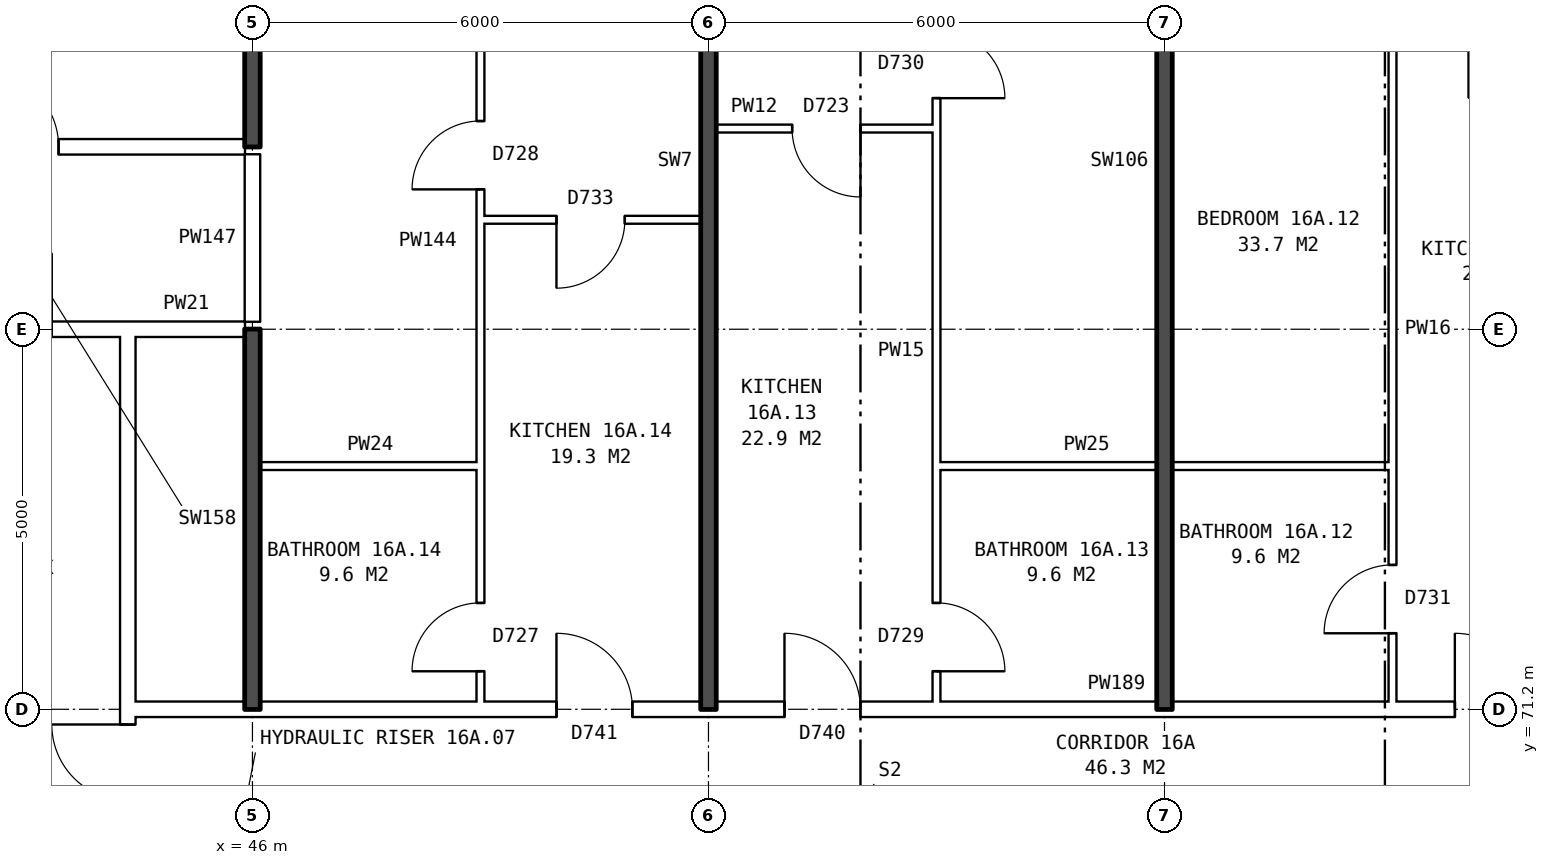
"""IFC4 building model, lengths in metres.
Left out: names, types, materials, properties, quantities, classifications, styles, units other than length and angle.
Written with IfcOpenShell. Run it as: python <this file> out.ifc"""

import sys

from ifc_helpers import new_model, si_unit, direction, frame, frame_2d, origin, place, context, subcontext, project, spatial, rectangle, extrude, element, fill, save


model = new_model("IFC4")
c1 = context("Model", 3, precision=1e-05, world=origin(), true_north=direction((0.0, 1.0)))
c2 = subcontext(c1, "Body", "Model", "MODEL_VIEW")
j1 = project(units=[si_unit("LENGTHUNIT", "METRE"), si_unit("PLANEANGLEUNIT", "RADIAN")], contexts=[c1])
p1 = place(None, origin())
s1 = spatial("IfcSite", under=j1, at=p1, CompositionType="ELEMENT")
p2 = place(p1, origin())
s2 = spatial("IfcBuilding", under=s1, at=p2, CompositionType="ELEMENT")
p3 = place(p2, frame((0.0, 0.0, 59.8)))
s3 = spatial("IfcBuildingStorey", under=s2, at=p3, CompositionType="ELEMENT", Elevation=59.8)
p4 = place(p3, frame((44.36, 63.9, 0.0), z_axis=(0.0, 0.0, 1.0), x_axis=(0.0, 1.0, 0.0)))
e1 = element("IfcWall", 1, at=p4, inside=s3, PredefinedType="PARTITIONING", context=c2, shape_type="SweptSolid", body=[
    extrude(rectangle(XDim=12.2, YDim=0.2, at=frame_2d((6.1, 0.0))), origin(), (0.0, 0.0, 1.0), 2.85),
])
p5 = place(p4, frame((5.1, 0.0, 0.0)))
e2 = element("IfcOpeningElement", 2, at=p5, cuts=e1, PredefinedType="OPENING", context=c2, shape_type="SweptSolid", body=[
    extrude(rectangle(XDim=2.0, YDim=2.1, at=frame_2d((1.0, 1.05))), frame((0.0, 0.11, 0.0), z_axis=(0.0, -1.0, 0.0), x_axis=(1.0, 0.0, 0.0)), (0.0, 0.0, 1.0), 0.22),
])
p6 = place(p3, frame((44.36, 71.2, 0.0), z_axis=(0.0, 0.0, 1.0), x_axis=(1.0, 0.0, 0.0)))
e3 = element("IfcWall", 3, at=p6, inside=s3, PredefinedType="PARTITIONING", context=c2, shape_type="SweptSolid", body=[
    extrude(rectangle(XDim=19.28, YDim=0.2, at=frame_2d((9.64, 0.0))), origin(), (0.0, 0.0, 1.0), 2.85),
])
p7 = place(p6, frame((17.46, 0.0, 0.0)))
e4 = element("IfcOpeningElement", 4, at=p7, cuts=e3, PredefinedType="OPENING", context=c2, shape_type="SweptSolid", body=[
    extrude(rectangle(XDim=1.0, YDim=2.1, at=frame_2d((0.5, 1.05))), frame((0.0, 0.11, 0.0), z_axis=(0.0, -1.0, 0.0), x_axis=(1.0, 0.0, 0.0)), (0.0, 0.0, 1.0), 0.22),
])
p8 = place(p6, frame((8.64, 0.0, 0.0)))
e5 = element("IfcOpeningElement", 5, at=p8, cuts=e3, PredefinedType="OPENING", context=c2, shape_type="SweptSolid", body=[
    extrude(rectangle(XDim=1.0, YDim=2.1, at=frame_2d((0.5, 1.05))), frame((0.0, 0.11, 0.0), z_axis=(0.0, -1.0, 0.0), x_axis=(1.0, 0.0, 0.0)), (0.0, 0.0, 1.0), 0.22),
])
p9 = place(p6, frame((5.64, 0.0, 0.0)))
e6 = element("IfcOpeningElement", 6, at=p9, cuts=e3, PredefinedType="OPENING", context=c2, shape_type="SweptSolid", body=[
    extrude(rectangle(XDim=1.0, YDim=2.1, at=frame_2d((0.5, 1.05))), frame((0.0, 0.11, 0.0), z_axis=(0.0, -1.0, 0.0), x_axis=(1.0, 0.0, 0.0)), (0.0, 0.0, 1.0), 0.22),
])
p10 = place(p3, frame((46.1, 74.4, 0.0), z_axis=(0.0, 0.0, 1.0), x_axis=(1.0, 0.0, 0.0)))
e7 = element("IfcWall", 7, at=p10, inside=s3, PredefinedType="PARTITIONING", context=c2, shape_type="SweptSolid", body=[
    extrude(rectangle(XDim=2.9, YDim=0.1, at=frame_2d((1.45, 0.0))), origin(), (0.0, 0.0, 1.0), 2.85),
])
p11 = place(p3, frame((55.0, 74.4, 0.0), z_axis=(0.0, 0.0, 1.0), x_axis=(1.0, 0.0, 0.0)))
e8 = element("IfcWall", 8, at=p11, inside=s3, PredefinedType="PARTITIONING", context=c2, shape_type="SweptSolid", body=[
    extrude(rectangle(XDim=6.0, YDim=0.1, at=frame_2d((3.0, 0.0))), origin(), (0.0, 0.0, 1.0), 2.85),
])
p12 = place(p3, frame((41.36, 76.2, 0.0), z_axis=(0.0, 0.0, 1.0), x_axis=(1.0, 0.0, 0.0)))
e9 = element("IfcWall", 9, at=p12, inside=s3, PredefinedType="PARTITIONING", context=c2, shape_type="SweptSolid", body=[
    extrude(rectangle(XDim=3.0, YDim=0.2, at=frame_2d((1.5, 0.0))), origin(), (0.0, 0.0, 1.0), 2.85),
])
p13 = place(p12, frame((1.0, 0.0, 0.0)))
e10 = element("IfcOpeningElement", 10, at=p13, cuts=e9, PredefinedType="OPENING", context=c2, shape_type="SweptSolid", body=[
    extrude(rectangle(XDim=1.0, YDim=2.1, at=frame_2d((0.5, 1.05))), frame((0.0, 0.11, 0.0), z_axis=(0.0, -1.0, 0.0), x_axis=(1.0, 0.0, 0.0)), (0.0, 0.0, 1.0), 0.22),
])
p14 = place(p3, frame((44.36, 76.2, 0.0), z_axis=(0.0, 0.0, 1.0), x_axis=(1.0, 0.0, 0.0)))
e11 = element("IfcWall", 11, at=p14, inside=s3, PredefinedType="PARTITIONING", context=c2, shape_type="SweptSolid", body=[
    extrude(rectangle(XDim=1.54, YDim=0.2, at=frame_2d((0.77, 0.0))), origin(), (0.0, 0.0, 1.0), 2.85),
])
p15 = place(p3, frame((49.0, 77.64, 0.0), z_axis=(0.0, 0.0, 1.0), x_axis=(1.0, 0.0, 0.0)))
e12 = element("IfcWall", 12, at=p15, inside=s3, PredefinedType="PARTITIONING", context=c2, shape_type="SweptSolid", body=[
    extrude(rectangle(XDim=2.9, YDim=0.1, at=frame_2d((1.45, 0.0))), origin(), (0.0, 0.0, 1.0), 2.85),
])
p16 = place(p15, frame((1.0, 0.0, 0.0)))
e13 = element("IfcOpeningElement", 13, at=p16, cuts=e12, PredefinedType="OPENING", context=c2, shape_type="SweptSolid", body=[
    extrude(rectangle(XDim=0.9, YDim=2.1, at=frame_2d((0.45, 1.05))), frame((0.0, 0.06, 0.0), z_axis=(0.0, -1.0, 0.0), x_axis=(1.0, 0.0, 0.0)), (0.0, 0.0, 1.0), 0.12),
])
p17 = place(p3, frame((21.86, 78.6, 0.0), z_axis=(0.0, 0.0, 1.0), x_axis=(1.0, 0.0, 0.0)))
e14 = element("IfcWall", 14, at=p17, inside=s3, PredefinedType="PARTITIONING", context=c2, shape_type="SweptSolid", body=[
    extrude(rectangle(XDim=24.04, YDim=0.2, at=frame_2d((12.02, 0.0))), origin(), (0.0, 0.0, 1.0), 2.85),
])
p18 = place(p17, frame((20.59, 0.0, 0.0)))
e15 = element("IfcOpeningElement", 15, at=p18, cuts=e14, PredefinedType="OPENING", context=c2, shape_type="SweptSolid", body=[
    extrude(rectangle(XDim=1.0, YDim=2.1, at=frame_2d((0.5, 1.05))), frame((0.0, 0.11, 0.0), z_axis=(0.0, -1.0, 0.0), x_axis=(1.0, 0.0, 0.0)), (0.0, 0.0, 1.0), 0.22),
])
p19 = place(p17, frame((8.64, 0.0, 0.0)))
e16 = element("IfcOpeningElement", 16, at=p19, cuts=e14, PredefinedType="OPENING", context=c2, shape_type="SweptSolid", body=[
    extrude(rectangle(XDim=1.0, YDim=2.1, at=frame_2d((0.5, 1.05))), frame((0.0, 0.11, 0.0), z_axis=(0.0, -1.0, 0.0), x_axis=(1.0, 0.0, 0.0)), (0.0, 0.0, 1.0), 0.22),
])
p20 = place(p17, frame((3.64, 0.0, 0.0)))
e17 = element("IfcOpeningElement", 17, at=p20, cuts=e14, PredefinedType="OPENING", context=c2, shape_type="SweptSolid", body=[
    extrude(rectangle(XDim=1.0, YDim=2.1, at=frame_2d((0.5, 1.05))), frame((0.0, 0.11, 0.0), z_axis=(0.0, -1.0, 0.0), x_axis=(1.0, 0.0, 0.0)), (0.0, 0.0, 1.0), 0.22),
])
p21 = place(p3, frame((52.1, 78.84, 0.0), z_axis=(0.0, 0.0, 1.0), x_axis=(1.0, 0.0, 0.0)))
e18 = element("IfcWall", 18, at=p21, inside=s3, PredefinedType="PARTITIONING", context=c2, shape_type="SweptSolid", body=[
    extrude(rectangle(XDim=2.9, YDim=0.1, at=frame_2d((1.45, 0.0))), origin(), (0.0, 0.0, 1.0), 2.85),
])
p22 = place(p21, frame((1.0, 0.0, 0.0)))
e19 = element("IfcOpeningElement", 19, at=p22, cuts=e18, PredefinedType="OPENING", context=c2, shape_type="SweptSolid", body=[
    extrude(rectangle(XDim=0.9, YDim=2.1, at=frame_2d((0.45, 1.05))), frame((0.0, 0.06, 0.0), z_axis=(0.0, -1.0, 0.0), x_axis=(1.0, 0.0, 0.0)), (0.0, 0.0, 1.0), 0.12),
])
p23 = place(p3, frame((46.0, 71.2, 0.0), z_axis=(0.0, 0.0, 1.0), x_axis=(0.0, 1.0, 0.0)))
e20 = element("IfcWall", 20, at=p23, inside=s3, PredefinedType="SOLIDWALL", context=c2, shape_type="SweptSolid", body=[
    extrude(rectangle(XDim=5.0, YDim=0.2, at=frame_2d((2.5, 0.0))), origin(), (0.0, 0.0, 1.0), 2.85),
])
p24 = place(p3, frame((46.0, 76.3, 0.0), z_axis=(0.0, 0.0, 1.0), x_axis=(0.0, 1.0, 0.0)))
e21 = element("IfcWall", 21, at=p24, inside=s3, PredefinedType="PARTITIONING", context=c2, shape_type="SweptSolid", body=[
    extrude(rectangle(XDim=2.2, YDim=0.2, at=frame_2d((1.1, 0.0))), origin(), (0.0, 0.0, 1.0), 2.85),
])
p25 = place(p3, frame((46.0, 78.6, 0.0), z_axis=(0.0, 0.0, 1.0), x_axis=(0.0, 1.0, 0.0)))
e22 = element("IfcWall", 22, at=p25, inside=s3, PredefinedType="SOLIDWALL", context=c2, shape_type="SweptSolid", body=[
    extrude(rectangle(XDim=7.04, YDim=0.2, at=frame_2d((3.52, 0.0))), origin(), (0.0, 0.0, 1.0), 2.85),
])
p26 = place(p3, frame((49.0, 71.3, 0.0), z_axis=(0.0, 0.0, 1.0), x_axis=(0.0, 1.0, 0.0)))
e23 = element("IfcWall", 23, at=p26, inside=s3, PredefinedType="PARTITIONING", context=c2, shape_type="SweptSolid", body=[
    extrude(rectangle(XDim=14.34, YDim=0.1, at=frame_2d((7.17, 0.0))), origin(), (0.0, 0.0, 1.0), 2.85),
])
p27 = place(p26, frame((6.74, 0.0, 0.0)))
e24 = element("IfcOpeningElement", 24, at=p27, cuts=e23, PredefinedType="OPENING", context=c2, shape_type="SweptSolid", body=[
    extrude(rectangle(XDim=0.9, YDim=2.1, at=frame_2d((0.45, 1.05))), frame((0.0, 0.06, 0.0), z_axis=(0.0, -1.0, 0.0), x_axis=(1.0, 0.0, 0.0)), (0.0, 0.0, 1.0), 0.12),
])
p28 = place(p26, frame((0.4, 0.0, 0.0)))
e25 = element("IfcOpeningElement", 25, at=p28, cuts=e23, PredefinedType="OPENING", context=c2, shape_type="SweptSolid", body=[
    extrude(rectangle(XDim=0.9, YDim=2.1, at=frame_2d((0.45, 1.05))), frame((0.0, 0.06, 0.0), z_axis=(0.0, -1.0, 0.0), x_axis=(1.0, 0.0, 0.0)), (0.0, 0.0, 1.0), 0.12),
])
p29 = place(p3, frame((52.0, 71.2, 0.0), z_axis=(0.0, 0.0, 1.0), x_axis=(0.0, 1.0, 0.0)))
e26 = element("IfcWall", 26, at=p29, inside=s3, PredefinedType="SOLIDWALL", context=c2, shape_type="SweptSolid", body=[
    extrude(rectangle(XDim=14.44, YDim=0.2, at=frame_2d((7.22, 0.0))), origin(), (0.0, 0.0, 1.0), 2.85),
])
p30 = place(p3, frame((55.0, 71.3, 0.0), z_axis=(0.0, 0.0, 1.0), x_axis=(0.0, 1.0, 0.0)))
e27 = element("IfcWall", 27, at=p30, inside=s3, PredefinedType="PARTITIONING", context=c2, shape_type="SweptSolid", body=[
    extrude(rectangle(XDim=14.34, YDim=0.1, at=frame_2d((7.17, 0.0))), origin(), (0.0, 0.0, 1.0), 2.85),
])
p31 = place(p30, frame((7.94, 0.0, 0.0)))
e28 = element("IfcOpeningElement", 28, at=p31, cuts=e27, PredefinedType="OPENING", context=c2, shape_type="SweptSolid", body=[
    extrude(rectangle(XDim=0.9, YDim=2.1, at=frame_2d((0.45, 1.05))), frame((0.0, 0.06, 0.0), z_axis=(0.0, -1.0, 0.0), x_axis=(1.0, 0.0, 0.0)), (0.0, 0.0, 1.0), 0.12),
])
p32 = place(p30, frame((0.4, 0.0, 0.0)))
e29 = element("IfcOpeningElement", 29, at=p32, cuts=e27, PredefinedType="OPENING", context=c2, shape_type="SweptSolid", body=[
    extrude(rectangle(XDim=0.9, YDim=2.1, at=frame_2d((0.45, 1.05))), frame((0.0, 0.06, 0.0), z_axis=(0.0, -1.0, 0.0), x_axis=(1.0, 0.0, 0.0)), (0.0, 0.0, 1.0), 0.12),
])
p33 = place(p3, frame((58.0, 71.2, 0.0), z_axis=(0.0, 0.0, 1.0), x_axis=(0.0, 1.0, 0.0)))
e30 = element("IfcWall", 30, at=p33, inside=s3, PredefinedType="SOLIDWALL", context=c2, shape_type="SweptSolid", body=[
    extrude(rectangle(XDim=14.44, YDim=0.2, at=frame_2d((7.22, 0.0))), origin(), (0.0, 0.0, 1.0), 2.85),
])
p34 = place(p3, frame((61.0, 71.3, 0.0), z_axis=(0.0, 0.0, 1.0), x_axis=(0.0, 1.0, 0.0)))
e31 = element("IfcWall", 31, at=p34, inside=s3, PredefinedType="PARTITIONING", context=c2, shape_type="SweptSolid", body=[
    extrude(rectangle(XDim=14.34, YDim=0.1, at=frame_2d((7.17, 0.0))), origin(), (0.0, 0.0, 1.0), 2.85),
])
p35 = place(p34, frame((9.24, 0.0, 0.0)))
e32 = element("IfcOpeningElement", 32, at=p35, cuts=e31, PredefinedType="OPENING", context=c2, shape_type="SweptSolid", body=[
    extrude(rectangle(XDim=0.9, YDim=2.1, at=frame_2d((0.45, 1.05))), frame((0.0, 0.06, 0.0), z_axis=(0.0, -1.0, 0.0), x_axis=(1.0, 0.0, 0.0)), (0.0, 0.0, 1.0), 0.12),
])
p36 = place(p34, frame((0.9, 0.0, 0.0)))
e33 = element("IfcOpeningElement", 33, at=p36, cuts=e31, PredefinedType="OPENING", context=c2, shape_type="SweptSolid", body=[
    extrude(rectangle(XDim=0.9, YDim=2.1, at=frame_2d((0.45, 1.05))), frame((0.0, 0.06, 0.0), z_axis=(0.0, -1.0, 0.0), x_axis=(1.0, 0.0, 0.0)), (0.0, 0.0, 1.0), 0.12),
])
p37 = place(p5, origin())
e34 = element("IfcDoor", 34, at=p37, inside=s3, OperationType="DOUBLE_DOOR_SINGLE_SWING", PredefinedType="DOOR", context=c2, shape_type="SweptSolid", body=[
    extrude(rectangle(XDim=2.0, YDim=2.1, at=frame_2d((1.0, 1.05))), frame((0.0, 0.025, 0.0), z_axis=(0.0, -1.0, 0.0), x_axis=(1.0, 0.0, 0.0)), (0.0, 0.0, 1.0), 0.05),
])
fill(e2, e34)
p38 = place(p7, origin())
e35 = element("IfcDoor", 35, at=p38, inside=s3, OperationType="SINGLE_SWING_LEFT", PredefinedType="DOOR", context=c2, shape_type="SweptSolid", body=[
    extrude(rectangle(XDim=1.0, YDim=2.1, at=frame_2d((0.5, 1.05))), frame((0.0, 0.025, 0.0), z_axis=(0.0, -1.0, 0.0), x_axis=(1.0, 0.0, 0.0)), (0.0, 0.0, 1.0), 0.05),
])
fill(e4, e35)
p39 = place(p36, origin())
e36 = element("IfcDoor", 36, at=p39, inside=s3, OperationType="SINGLE_SWING_LEFT", PredefinedType="DOOR", context=c2, shape_type="SweptSolid", body=[
    extrude(rectangle(XDim=0.9, YDim=2.1, at=frame_2d((0.45, 1.05))), frame((0.0, 0.025, 0.0), z_axis=(0.0, -1.0, 0.0), x_axis=(1.0, 0.0, 0.0)), (0.0, 0.0, 1.0), 0.05),
])
fill(e33, e36)
p40 = place(p31, frame((0.9, 0.0, 0.0), z_axis=(0.0, 0.0, 1.0), x_axis=(-1.0, 0.0, 0.0)))
e37 = element("IfcDoor", 37, at=p40, inside=s3, OperationType="SINGLE_SWING_RIGHT", PredefinedType="DOOR", context=c2, shape_type="SweptSolid", body=[
    extrude(rectangle(XDim=0.9, YDim=2.1, at=frame_2d((0.45, 1.05))), frame((0.0, 0.025, 0.0), z_axis=(0.0, -1.0, 0.0), x_axis=(1.0, 0.0, 0.0)), (0.0, 0.0, 1.0), 0.05),
])
fill(e28, e37)
p41 = place(p8, origin())
e38 = element("IfcDoor", 38, at=p41, inside=s3, OperationType="SINGLE_SWING_LEFT", PredefinedType="DOOR", context=c2, shape_type="SweptSolid", body=[
    extrude(rectangle(XDim=1.0, YDim=2.1, at=frame_2d((0.5, 1.05))), frame((0.0, 0.025, 0.0), z_axis=(0.0, -1.0, 0.0), x_axis=(1.0, 0.0, 0.0)), (0.0, 0.0, 1.0), 0.05),
])
fill(e5, e38)
p42 = place(p22, frame((0.9, 0.0, 0.0), z_axis=(0.0, 0.0, 1.0), x_axis=(-1.0, 0.0, 0.0)))
e39 = element("IfcDoor", 39, at=p42, inside=s3, OperationType="SINGLE_SWING_LEFT", PredefinedType="DOOR", context=c2, shape_type="SweptSolid", body=[
    extrude(rectangle(XDim=0.9, YDim=2.1, at=frame_2d((0.45, 1.05))), frame((0.0, 0.025, 0.0), z_axis=(0.0, -1.0, 0.0), x_axis=(1.0, 0.0, 0.0)), (0.0, 0.0, 1.0), 0.05),
])
fill(e19, e39)
p43 = place(p32, frame((0.9, 0.0, 0.0), z_axis=(0.0, 0.0, 1.0), x_axis=(-1.0, 0.0, 0.0)))
e40 = element("IfcDoor", 40, at=p43, inside=s3, OperationType="SINGLE_SWING_RIGHT", PredefinedType="DOOR", context=c2, shape_type="SweptSolid", body=[
    extrude(rectangle(XDim=0.9, YDim=2.1, at=frame_2d((0.45, 1.05))), frame((0.0, 0.025, 0.0), z_axis=(0.0, -1.0, 0.0), x_axis=(1.0, 0.0, 0.0)), (0.0, 0.0, 1.0), 0.05),
])
fill(e29, e40)
p44 = place(p27, origin())
e41 = element("IfcDoor", 41, at=p44, inside=s3, OperationType="SINGLE_SWING_LEFT", PredefinedType="DOOR", context=c2, shape_type="SweptSolid", body=[
    extrude(rectangle(XDim=0.9, YDim=2.1, at=frame_2d((0.45, 1.05))), frame((0.0, 0.025, 0.0), z_axis=(0.0, -1.0, 0.0), x_axis=(1.0, 0.0, 0.0)), (0.0, 0.0, 1.0), 0.05),
])
fill(e24, e41)
p45 = place(p9, origin())
e42 = element("IfcDoor", 42, at=p45, inside=s3, OperationType="SINGLE_SWING_LEFT", PredefinedType="DOOR", context=c2, shape_type="SweptSolid", body=[
    extrude(rectangle(XDim=1.0, YDim=2.1, at=frame_2d((0.5, 1.05))), frame((0.0, 0.025, 0.0), z_axis=(0.0, -1.0, 0.0), x_axis=(1.0, 0.0, 0.0)), (0.0, 0.0, 1.0), 0.05),
])
fill(e6, e42)
p46 = place(p16, frame((0.9, 0.0, 0.0), z_axis=(0.0, 0.0, 1.0), x_axis=(-1.0, 0.0, 0.0)))
e43 = element("IfcDoor", 43, at=p46, inside=s3, OperationType="SINGLE_SWING_RIGHT", PredefinedType="DOOR", context=c2, shape_type="SweptSolid", body=[
    extrude(rectangle(XDim=0.9, YDim=2.1, at=frame_2d((0.45, 1.05))), frame((0.0, 0.025, 0.0), z_axis=(0.0, -1.0, 0.0), x_axis=(1.0, 0.0, 0.0)), (0.0, 0.0, 1.0), 0.05),
])
fill(e13, e43)
p47 = place(p28, origin())
e44 = element("IfcDoor", 44, at=p47, inside=s3, OperationType="SINGLE_SWING_LEFT", PredefinedType="DOOR", context=c2, shape_type="SweptSolid", body=[
    extrude(rectangle(XDim=0.9, YDim=2.1, at=frame_2d((0.45, 1.05))), frame((0.0, 0.025, 0.0), z_axis=(0.0, -1.0, 0.0), x_axis=(1.0, 0.0, 0.0)), (0.0, 0.0, 1.0), 0.05),
])
fill(e25, e44)
p48 = place(p18, origin())
e45 = element("IfcDoor", 45, at=p48, inside=s3, OperationType="SINGLE_SWING_LEFT", PredefinedType="DOOR", context=c2, shape_type="SweptSolid", body=[
    extrude(rectangle(XDim=1.0, YDim=2.1, at=frame_2d((0.5, 1.05))), frame((0.0, 0.025, 0.0), z_axis=(0.0, -1.0, 0.0), x_axis=(1.0, 0.0, 0.0)), (0.0, 0.0, 1.0), 0.05),
])
fill(e15, e45)
save(model, sys.argv[1])
